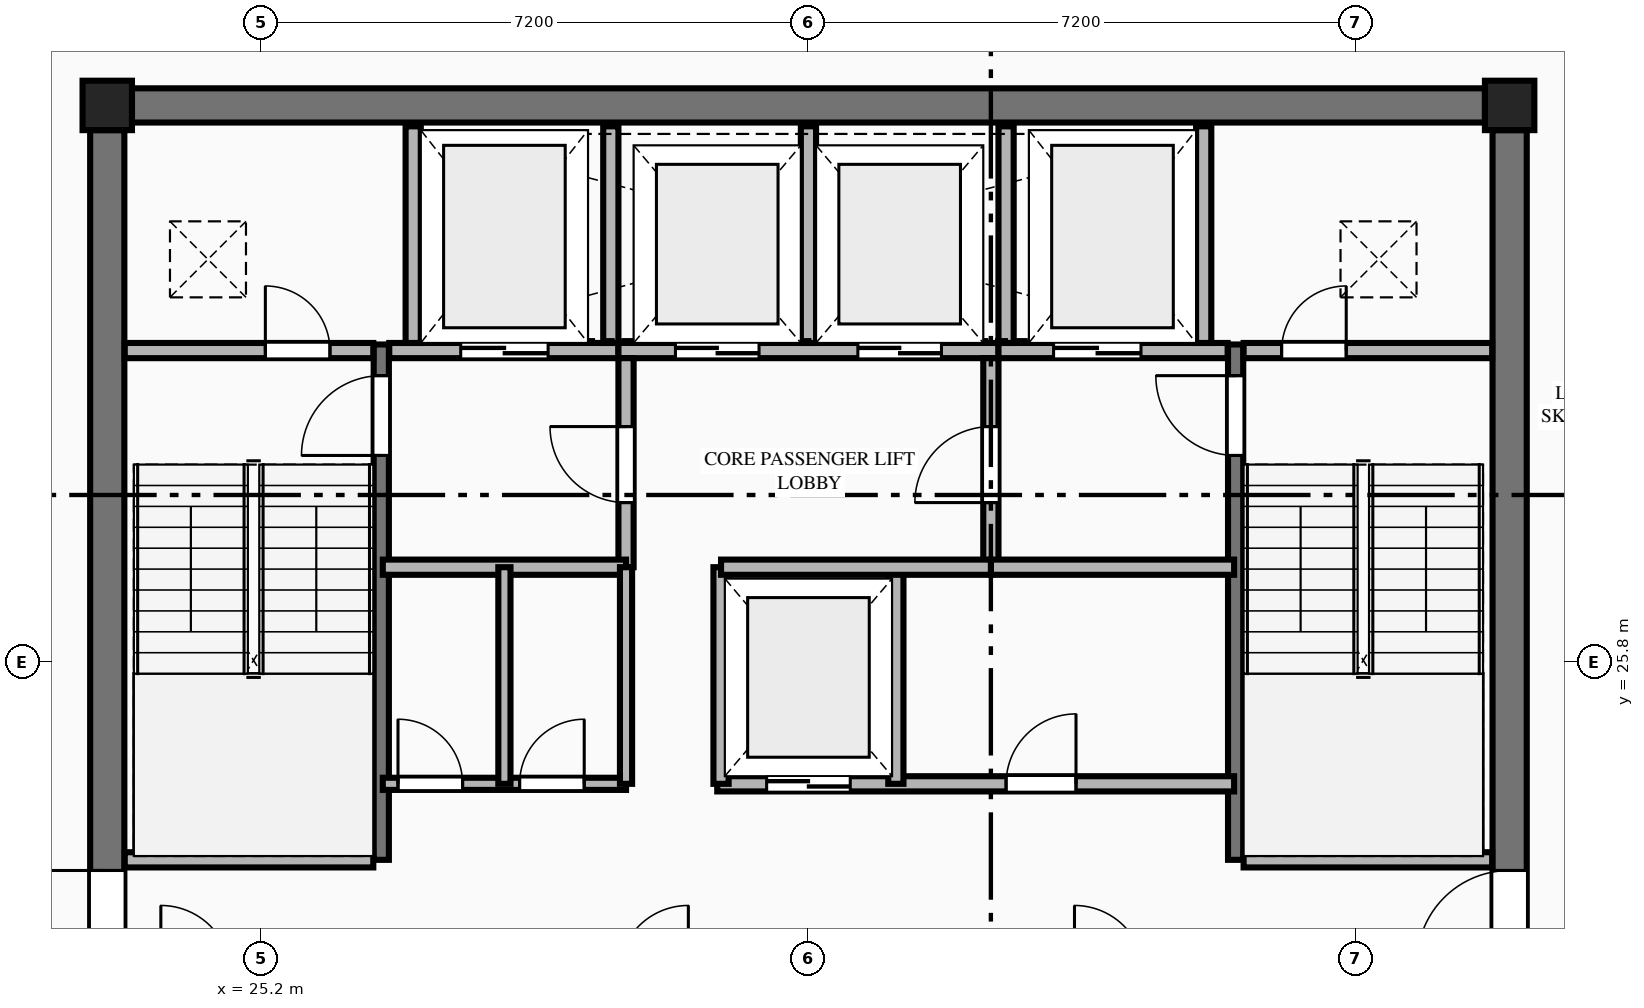
"""IFC4 building model, lengths in metres.
Left out: names, types, materials, properties, quantities, classifications, styles, units other than length and angle.
Written with IfcOpenShell. Run it as: python <this file> out.ifc"""

import sys

from ifc_helpers import new_model, si_unit, direction, frame, frame_2d, origin, origin_2d, place, context, subcontext, project, spatial, rectangle, extrude, element, fill, save


model = new_model("IFC4")
c1 = context("Model", 3, precision=1e-05, world=origin(), true_north=direction((0.0, 1.0)))
c2 = subcontext(c1, "Body", "Model", "MODEL_VIEW")
j1 = project(units=[si_unit("LENGTHUNIT", "METRE"), si_unit("PLANEANGLEUNIT", "RADIAN")], contexts=[c1])
p1 = place(None, origin())
s1 = spatial("IfcSite", under=j1, at=p1, CompositionType="ELEMENT")
p2 = place(p1, origin())
s2 = spatial("IfcBuilding", under=s1, at=p2, CompositionType="ELEMENT")
p3 = place(p2, frame((0.0, 0.0, 274.45)))
s3 = spatial("IfcBuildingStorey", under=s2, at=p3, CompositionType="ELEMENT", Elevation=274.45)
for number, where, z_axis, x_axis in (
    (1, (41.625, 33.125, 0.0), (0.0, 0.0, 1.0), (1.0, 0.0, 0.0)),
    (2, (23.175, 33.125, 0.0), (0.0, 0.0, 1.0), (1.0, 0.0, 0.0)),
):
    element("IfcColumn", number, at=place(p3, frame(where, z_axis=z_axis, x_axis=x_axis)), inside=s3, PredefinedType="COLUMN", context=c2, shape_type="SweptSolid", body=[
        extrude(rectangle(XDim=0.65, YDim=0.65, at=origin_2d()), origin(), (0.0, 0.0, 1.0), 3.65),
    ])
p4 = place(p3, frame((23.5, 33.125, 0.0), z_axis=(0.0, 0.0, 1.0), x_axis=(1.0, 0.0, 0.0)))
e3 = element("IfcWall", 3, at=p4, inside=s3, PredefinedType="SHEAR", context=c2, shape_type="SweptSolid", body=[
    extrude(rectangle(XDim=17.8, YDim=0.45, at=frame_2d((8.9, 0.0))), origin(), (0.0, 0.0, 1.0), 3.37),
])
p5 = place(p3, frame((23.175, 19.0, 0.0), z_axis=(0.0, 0.0, 1.0), x_axis=(0.0, 1.0, 0.0)))
e4 = element("IfcWall", 4, at=p5, inside=s3, PredefinedType="SHEAR", context=c2, shape_type="SweptSolid", body=[
    extrude(rectangle(XDim=13.8, YDim=0.45, at=frame_2d((6.9, 0.0))), origin(), (0.0, 0.0, 1.0), 3.37),
])
p6 = place(p5, frame((2.84, 0.0, 0.0)))
e5 = element("IfcOpeningElement", 5, at=p6, cuts=e4, PredefinedType="OPENING", context=c2, shape_type="SweptSolid", body=[
    extrude(rectangle(XDim=1.22, YDim=2.25, at=frame_2d((0.61, 1.125))), frame((0.0, 0.235, 0.0), z_axis=(0.0, -1.0, 0.0), x_axis=(1.0, 0.0, 0.0)), (0.0, 0.0, 1.0), 0.47),
])
p7 = place(p3, frame((41.625, 19.0, 0.0), z_axis=(0.0, 0.0, 1.0), x_axis=(0.0, 1.0, 0.0)))
e6 = element("IfcWall", 6, at=p7, inside=s3, PredefinedType="SHEAR", context=c2, shape_type="SweptSolid", body=[
    extrude(rectangle(XDim=13.8, YDim=0.45, at=frame_2d((6.9, 0.0))), origin(), (0.0, 0.0, 1.0), 3.37),
])
p8 = place(p7, frame((2.84, 0.0, 0.0)))
e7 = element("IfcOpeningElement", 7, at=p8, cuts=e6, PredefinedType="OPENING", context=c2, shape_type="SweptSolid", body=[
    extrude(rectangle(XDim=1.22, YDim=2.25, at=frame_2d((0.61, 1.125))), frame((0.0, 0.235, 0.0), z_axis=(0.0, -1.0, 0.0), x_axis=(1.0, 0.0, 0.0)), (0.0, 0.0, 1.0), 0.47),
])
p9 = place(p3, frame((26.78, 23.2, 0.0), z_axis=(0.0, 0.0, 1.0), x_axis=(0.0, 1.0, 0.0)))
e8 = element("IfcWall", 8, at=p9, inside=s3, PredefinedType="SHEAR", context=c2, shape_type="SweptSolid", body=[
    extrude(rectangle(XDim=6.78, YDim=0.2, at=frame_2d((3.39, 0.0))), origin(), (0.0, 0.0, 1.0), 3.65),
])
p10 = place(p9, frame((5.32, 0.0, 0.0)))
e9 = element("IfcOpeningElement", 9, at=p10, cuts=e8, PredefinedType="OPENING", context=c2, shape_type="SweptSolid", body=[
    extrude(rectangle(XDim=1.05, YDim=2.15, at=frame_2d((0.525, 1.075))), frame((0.0, 0.11, 0.0), z_axis=(0.0, -1.0, 0.0), x_axis=(1.0, 0.0, 0.0)), (0.0, 0.0, 1.0), 0.22),
])
p11 = place(p3, frame((23.405, 23.2, 0.0), z_axis=(0.0, 0.0, 1.0), x_axis=(1.0, 0.0, 0.0)))
e10 = element("IfcWall", 10, at=p11, inside=s3, PredefinedType="PLUMBINGWALL", context=c2, shape_type="SweptSolid", body=[
    extrude(rectangle(XDim=3.27, YDim=0.2, at=frame_2d((1.635, 0.0))), origin(), (0.0, 0.0, 1.0), 3.37),
])
p12 = place(p3, frame((38.02, 23.2, 0.0), z_axis=(0.0, 0.0, 1.0), x_axis=(0.0, 1.0, 0.0)))
e11 = element("IfcWall", 11, at=p12, inside=s3, PredefinedType="SHEAR", context=c2, shape_type="SweptSolid", body=[
    extrude(rectangle(XDim=6.78, YDim=0.2, at=frame_2d((3.39, 0.0))), origin(), (0.0, 0.0, 1.0), 3.65),
])
p13 = place(p12, frame((5.32, 0.0, 0.0)))
e12 = element("IfcOpeningElement", 12, at=p13, cuts=e11, PredefinedType="OPENING", context=c2, shape_type="SweptSolid", body=[
    extrude(rectangle(XDim=1.05, YDim=2.15, at=frame_2d((0.525, 1.075))), frame((0.0, 0.11, 0.0), z_axis=(0.0, -1.0, 0.0), x_axis=(1.0, 0.0, 0.0)), (0.0, 0.0, 1.0), 0.22),
])
p14 = place(p3, frame((38.125, 23.2, 0.0), z_axis=(0.0, 0.0, 1.0), x_axis=(1.0, 0.0, 0.0)))
e13 = element("IfcWall", 13, at=p14, inside=s3, PredefinedType="PLUMBINGWALL", context=c2, shape_type="SweptSolid", body=[
    extrude(rectangle(XDim=3.27, YDim=0.2, at=frame_2d((1.635, 0.0))), origin(), (0.0, 0.0, 1.0), 3.37),
])
p15 = place(p3, frame((23.405, 29.9, 0.0), z_axis=(0.0, 0.0, 1.0), x_axis=(1.0, 0.0, 0.0)))
e14 = element("IfcWall", 14, at=p15, inside=s3, PredefinedType="PLUMBINGWALL", context=c2, shape_type="SweptSolid", body=[
    extrude(rectangle(XDim=3.27, YDim=0.2, at=frame_2d((1.635, 0.0))), origin(), (0.0, 0.0, 1.0), 3.37),
])
p16 = place(p15, frame((1.85, 0.0, 0.0)))
e15 = element("IfcOpeningElement", 15, at=p16, cuts=e14, PredefinedType="OPENING", context=c2, shape_type="SweptSolid", body=[
    extrude(rectangle(XDim=0.85, YDim=2.05, at=frame_2d((0.425, 1.025))), frame((0.0, 0.11, 0.0), z_axis=(0.0, -1.0, 0.0), x_axis=(1.0, 0.0, 0.0)), (0.0, 0.0, 1.0), 0.22),
])
p17 = place(p3, frame((26.885, 29.9, 0.0), z_axis=(0.0, 0.0, 1.0), x_axis=(1.0, 0.0, 0.0)))
e16 = element("IfcWall", 16, at=p17, inside=s3, PredefinedType="PLUMBINGWALL", context=c2, shape_type="SweptSolid", body=[
    extrude(rectangle(XDim=3.015, YDim=0.2, at=frame_2d((1.507, 0.0))), origin(), (0.0, 0.0, 1.0), 3.37),
])
p18 = place(p17, frame((0.94, 0.0, 0.0)))
e17 = element("IfcOpeningElement", 17, at=p18, cuts=e16, PredefinedType="OPENING", context=c2, shape_type="SweptSolid", body=[
    extrude(rectangle(XDim=1.15, YDim=2.2, at=frame_2d((0.575, 1.1))), frame((0.0, 0.11, 0.0), z_axis=(0.0, -1.0, 0.0), x_axis=(1.0, 0.0, 0.0)), (0.0, 0.0, 1.0), 0.22),
])
p19 = place(p3, frame((29.9, 29.9, 0.0), z_axis=(0.0, 0.0, 1.0), x_axis=(1.0, 0.0, 0.0)))
e18 = element("IfcWall", 18, at=p19, inside=s3, PredefinedType="PLUMBINGWALL", context=c2, shape_type="SweptSolid", body=[
    extrude(rectangle(XDim=5.0, YDim=0.2, at=frame_2d((2.5, 0.0))), origin(), (0.0, 0.0, 1.0), 3.37),
])
p20 = place(p19, frame((0.75, 0.0, 0.0)))
e19 = element("IfcOpeningElement", 19, at=p20, cuts=e18, PredefinedType="OPENING", context=c2, shape_type="SweptSolid", body=[
    extrude(rectangle(XDim=1.1, YDim=2.2, at=frame_2d((0.55, 1.1))), frame((0.0, 0.11, 0.0), z_axis=(0.0, -1.0, 0.0), x_axis=(1.0, 0.0, 0.0)), (0.0, 0.0, 1.0), 0.22),
])
p21 = place(p19, frame((3.15, 0.0, 0.0)))
e20 = element("IfcOpeningElement", 20, at=p21, cuts=e18, PredefinedType="OPENING", context=c2, shape_type="SweptSolid", body=[
    extrude(rectangle(XDim=1.1, YDim=2.2, at=frame_2d((0.55, 1.1))), frame((0.0, 0.11, 0.0), z_axis=(0.0, -1.0, 0.0), x_axis=(1.0, 0.0, 0.0)), (0.0, 0.0, 1.0), 0.22),
])
p22 = place(p3, frame((34.9, 29.9, 0.0), z_axis=(0.0, 0.0, 1.0), x_axis=(1.0, 0.0, 0.0)))
e21 = element("IfcWall", 21, at=p22, inside=s3, PredefinedType="PLUMBINGWALL", context=c2, shape_type="SweptSolid", body=[
    extrude(rectangle(XDim=3.015, YDim=0.2, at=frame_2d((1.508, 0.0))), origin(), (0.0, 0.0, 1.0), 3.37),
])
p23 = place(p22, frame((0.725, 0.0, 0.0)))
e22 = element("IfcOpeningElement", 22, at=p23, cuts=e21, PredefinedType="OPENING", context=c2, shape_type="SweptSolid", body=[
    extrude(rectangle(XDim=1.15, YDim=2.2, at=frame_2d((0.575, 1.1))), frame((0.0, 0.11, 0.0), z_axis=(0.0, -1.0, 0.0), x_axis=(1.0, 0.0, 0.0)), (0.0, 0.0, 1.0), 0.22),
])
p24 = place(p3, frame((38.125, 29.9, 0.0), z_axis=(0.0, 0.0, 1.0), x_axis=(1.0, 0.0, 0.0)))
e23 = element("IfcWall", 23, at=p24, inside=s3, PredefinedType="PLUMBINGWALL", context=c2, shape_type="SweptSolid", body=[
    extrude(rectangle(XDim=3.27, YDim=0.2, at=frame_2d((1.635, 0.0))), origin(), (0.0, 0.0, 1.0), 3.37),
])
p25 = place(p24, frame((0.5, 0.0, 0.0)))
e24 = element("IfcOpeningElement", 24, at=p25, cuts=e23, PredefinedType="OPENING", context=c2, shape_type="SweptSolid", body=[
    extrude(rectangle(XDim=0.85, YDim=2.05, at=frame_2d((0.425, 1.025))), frame((0.0, 0.11, 0.0), z_axis=(0.0, -1.0, 0.0), x_axis=(1.0, 0.0, 0.0)), (0.0, 0.0, 1.0), 0.22),
])
for number, where, z_axis, x_axis in (
    (25, (27.2, 30.0, 0.0), (0.0, 0.0, 1.0), (0.0, 1.0, 0.0)),
    (26, (29.8, 30.0, 0.0), (0.0, 0.0, 1.0), (0.0, 1.0, 0.0)),
    (27, (32.4, 30.0, 0.0), (0.0, 0.0, 1.0), (0.0, 1.0, 0.0)),
    (28, (35.0, 30.0, 0.0), (0.0, 0.0, 1.0), (0.0, 1.0, 0.0)),
    (29, (37.6, 30.0, 0.0), (0.0, 0.0, 1.0), (0.0, 1.0, 0.0)),
):
    element("IfcWall", number, at=place(p3, frame(where, z_axis=z_axis, x_axis=x_axis)), inside=s3, PredefinedType="PLUMBINGWALL", context=c2, shape_type="SweptSolid", body=[
        extrude(rectangle(XDim=2.85, YDim=0.2, at=frame_2d((1.425, 0.0))), origin(), (0.0, 0.0, 1.0), 3.37),
    ])
p26 = place(p3, frame((30.0, 27.05, 0.0), z_axis=(0.0, 0.0, 1.0), x_axis=(0.0, 1.0, 0.0)))
e30 = element("IfcWall", 30, at=p26, inside=s3, PredefinedType="PLUMBINGWALL", context=c2, shape_type="SweptSolid", body=[
    extrude(rectangle(XDim=2.75, YDim=0.2, at=frame_2d((1.375, 0.0))), origin(), (0.0, 0.0, 1.0), 3.37),
])
p27 = place(p26, frame((0.85, 0.0, 0.0)))
e31 = element("IfcOpeningElement", 31, at=p27, cuts=e30, PredefinedType="OPENING", context=c2, shape_type="SweptSolid", body=[
    extrude(rectangle(XDim=1.0, YDim=2.15, at=frame_2d((0.5, 1.075))), frame((0.0, 0.11, 0.0), z_axis=(0.0, -1.0, 0.0), x_axis=(1.0, 0.0, 0.0)), (0.0, 0.0, 1.0), 0.22),
])
p28 = place(p3, frame((26.8, 27.05, 0.0), z_axis=(0.0, 0.0, 1.0), x_axis=(1.0, 0.0, 0.0)))
e32 = element("IfcWall", 32, at=p28, inside=s3, PredefinedType="PLUMBINGWALL", context=c2, shape_type="SweptSolid", body=[
    extrude(rectangle(XDim=3.2, YDim=0.2, at=frame_2d((1.6, 0.0))), origin(), (0.0, 0.0, 1.0), 3.37),
])
p29 = place(p3, frame((34.8, 27.05, 0.0), z_axis=(0.0, 0.0, 1.0), x_axis=(0.0, 1.0, 0.0)))
e33 = element("IfcWall", 33, at=p29, inside=s3, PredefinedType="PLUMBINGWALL", context=c2, shape_type="SweptSolid", body=[
    extrude(rectangle(XDim=2.75, YDim=0.2, at=frame_2d((1.375, 0.0))), origin(), (0.0, 0.0, 1.0), 3.37),
])
p30 = place(p29, frame((0.85, 0.0, 0.0)))
e34 = element("IfcOpeningElement", 34, at=p30, cuts=e33, PredefinedType="OPENING", context=c2, shape_type="SweptSolid", body=[
    extrude(rectangle(XDim=1.0, YDim=2.15, at=frame_2d((0.5, 1.075))), frame((0.0, 0.11, 0.0), z_axis=(0.0, -1.0, 0.0), x_axis=(1.0, 0.0, 0.0)), (0.0, 0.0, 1.0), 0.22),
])
p31 = place(p3, frame((34.8, 27.05, 0.0), z_axis=(0.0, 0.0, 1.0), x_axis=(1.0, 0.0, 0.0)))
e35 = element("IfcWall", 35, at=p31, inside=s3, PredefinedType="PLUMBINGWALL", context=c2, shape_type="SweptSolid", body=[
    extrude(rectangle(XDim=3.2, YDim=0.2, at=frame_2d((1.6, 0.0))), origin(), (0.0, 0.0, 1.0), 3.37),
])
p32 = place(p3, frame((26.8, 24.2, 0.0), z_axis=(0.0, 0.0, 1.0), x_axis=(1.0, 0.0, 0.0)))
e36 = element("IfcWall", 36, at=p32, inside=s3, PredefinedType="PARTITIONING", context=c2, shape_type="SweptSolid", body=[
    extrude(rectangle(XDim=3.2, YDim=0.16, at=frame_2d((1.6, 0.0))), origin(), (0.0, 0.0, 1.0), 3.37),
])
p33 = place(p32, frame((0.2, 0.0, 0.0)))
e37 = element("IfcOpeningElement", 37, at=p33, cuts=e36, PredefinedType="OPENING", context=c2, shape_type="SweptSolid", body=[
    extrude(rectangle(XDim=0.85, YDim=2.05, at=frame_2d((0.425, 1.025))), frame((0.0, 0.09, 0.0), z_axis=(0.0, -1.0, 0.0), x_axis=(1.0, 0.0, 0.0)), (0.0, 0.0, 1.0), 0.18),
])
p34 = place(p32, frame((1.8, 0.0, 0.0)))
e38 = element("IfcOpeningElement", 38, at=p34, cuts=e36, PredefinedType="OPENING", context=c2, shape_type="SweptSolid", body=[
    extrude(rectangle(XDim=0.85, YDim=2.05, at=frame_2d((0.425, 1.025))), frame((0.0, 0.09, 0.0), z_axis=(0.0, -1.0, 0.0), x_axis=(1.0, 0.0, 0.0)), (0.0, 0.0, 1.0), 0.18),
])
p35 = place(p3, frame((30.0, 24.2, 0.0), z_axis=(0.0, 0.0, 1.0), x_axis=(0.0, 1.0, 0.0)))
e39 = element("IfcWall", 39, at=p35, inside=s3, PredefinedType="PARTITIONING", context=c2, shape_type="SweptSolid", body=[
    extrude(rectangle(XDim=2.85, YDim=0.16, at=frame_2d((1.425, 0.0))), origin(), (0.0, 0.0, 1.0), 3.37),
])
p36 = place(p3, frame((31.2, 24.2, 0.0), z_axis=(0.0, 0.0, 1.0), x_axis=(1.0, 0.0, 0.0)))
e40 = element("IfcWall", 40, at=p36, inside=s3, PredefinedType="PLUMBINGWALL", context=c2, shape_type="SweptSolid", body=[
    extrude(rectangle(XDim=6.8, YDim=0.2, at=frame_2d((3.4, 0.0))), origin(), (0.0, 0.0, 1.0), 3.37),
])
p37 = place(p36, frame((0.65, 0.0, 0.0)))
e41 = element("IfcOpeningElement", 41, at=p37, cuts=e40, PredefinedType="OPENING", context=c2, shape_type="SweptSolid", body=[
    extrude(rectangle(XDim=1.1, YDim=2.2, at=frame_2d((0.55, 1.1))), frame((0.0, 0.11, 0.0), z_axis=(0.0, -1.0, 0.0), x_axis=(1.0, 0.0, 0.0)), (0.0, 0.0, 1.0), 0.22),
])
p38 = place(p36, frame((3.8, 0.0, 0.0)))
e42 = element("IfcOpeningElement", 42, at=p38, cuts=e40, PredefinedType="OPENING", context=c2, shape_type="SweptSolid", body=[
    extrude(rectangle(XDim=0.92, YDim=2.15, at=frame_2d((0.46, 1.075))), frame((0.0, 0.11, 0.0), z_axis=(0.0, -1.0, 0.0), x_axis=(1.0, 0.0, 0.0)), (0.0, 0.0, 1.0), 0.22),
])
for number, where, z_axis, x_axis in (
    (43, (31.25, 24.2, 0.0), (0.0, 0.0, 1.0), (0.0, 1.0, 0.0)),
    (44, (33.55, 24.2, 0.0), (0.0, 0.0, 1.0), (0.0, 1.0, 0.0)),
):
    element("IfcWall", number, at=place(p3, frame(where, z_axis=z_axis, x_axis=x_axis)), inside=s3, PredefinedType="PLUMBINGWALL", context=c2, shape_type="SweptSolid", body=[
        extrude(rectangle(XDim=2.85, YDim=0.2, at=frame_2d((1.425, 0.0))), origin(), (0.0, 0.0, 1.0), 3.37),
    ])
p39 = place(p3, frame((31.25, 27.05, 0.0), z_axis=(0.0, 0.0, 1.0), x_axis=(1.0, 0.0, 0.0)))
e45 = element("IfcWall", 45, at=p39, inside=s3, PredefinedType="PLUMBINGWALL", context=c2, shape_type="SweptSolid", body=[
    extrude(rectangle(XDim=3.55, YDim=0.2, at=frame_2d((1.775, 0.0))), origin(), (0.0, 0.0, 1.0), 3.37),
])
p40 = place(p3, frame((28.4, 24.2, 0.0), z_axis=(0.0, 0.0, 1.0), x_axis=(0.0, 1.0, 0.0)))
e46 = element("IfcWall", 46, at=p40, inside=s3, PredefinedType="PARTITIONING", context=c2, shape_type="SweptSolid", body=[
    extrude(rectangle(XDim=2.85, YDim=0.16, at=frame_2d((1.425, 0.0))), origin(), (0.0, 0.0, 1.0), 3.37),
])
p41 = place(p6, origin())
e47 = element("IfcDoor", 47, at=p41, inside=s3, OperationType="SINGLE_SWING_RIGHT", PredefinedType="DOOR", context=c2, shape_type="SweptSolid", body=[
    extrude(rectangle(XDim=1.22, YDim=2.25, at=frame_2d((0.61, 1.125))), frame((0.0, 0.025, 0.0), z_axis=(0.0, -1.0, 0.0), x_axis=(1.0, 0.0, 0.0)), (0.0, 0.0, 1.0), 0.05),
])
fill(e5, e47)
p42 = place(p8, origin())
e48 = element("IfcDoor", 48, at=p42, inside=s3, OperationType="SINGLE_SWING_LEFT", PredefinedType="DOOR", context=c2, shape_type="SweptSolid", body=[
    extrude(rectangle(XDim=1.22, YDim=2.25, at=frame_2d((0.61, 1.125))), frame((0.0, 0.025, 0.0), z_axis=(0.0, -1.0, 0.0), x_axis=(1.0, 0.0, 0.0)), (0.0, 0.0, 1.0), 0.05),
])
fill(e7, e48)
p43 = place(p10, origin())
e49 = element("IfcDoor", 49, at=p43, inside=s3, OperationType="SINGLE_SWING_LEFT", PredefinedType="DOOR", context=c2, shape_type="SweptSolid", body=[
    extrude(rectangle(XDim=1.05, YDim=2.15, at=frame_2d((0.525, 1.075))), frame((0.0, 0.025, 0.0), z_axis=(0.0, -1.0, 0.0), x_axis=(1.0, 0.0, 0.0)), (0.0, 0.0, 1.0), 0.05),
])
fill(e9, e49)
p44 = place(p13, origin())
e50 = element("IfcDoor", 50, at=p44, inside=s3, OperationType="SINGLE_SWING_RIGHT", PredefinedType="DOOR", context=c2, shape_type="SweptSolid", body=[
    extrude(rectangle(XDim=1.05, YDim=2.15, at=frame_2d((0.525, 1.075))), frame((0.0, 0.025, 0.0), z_axis=(0.0, -1.0, 0.0), x_axis=(1.0, 0.0, 0.0)), (0.0, 0.0, 1.0), 0.05),
])
fill(e12, e50)
p45 = place(p16, origin())
e51 = element("IfcDoor", 51, at=p45, inside=s3, OperationType="SINGLE_SWING_LEFT", PredefinedType="DOOR", context=c2, shape_type="SweptSolid", body=[
    extrude(rectangle(XDim=0.85, YDim=2.05, at=frame_2d((0.425, 1.025))), frame((0.0, 0.025, 0.0), z_axis=(0.0, -1.0, 0.0), x_axis=(1.0, 0.0, 0.0)), (0.0, 0.0, 1.0), 0.05),
])
fill(e15, e51)
p46 = place(p25, origin())
e52 = element("IfcDoor", 52, at=p46, inside=s3, OperationType="SINGLE_SWING_RIGHT", PredefinedType="DOOR", context=c2, shape_type="SweptSolid", body=[
    extrude(rectangle(XDim=0.85, YDim=2.05, at=frame_2d((0.425, 1.025))), frame((0.0, 0.025, 0.0), z_axis=(0.0, -1.0, 0.0), x_axis=(1.0, 0.0, 0.0)), (0.0, 0.0, 1.0), 0.05),
])
fill(e24, e52)
p47 = place(p18, origin())
e53 = element("IfcDoor", 53, at=p47, inside=s3, OperationType="DOUBLE_DOOR_SLIDING", PredefinedType="DOOR", context=c2, shape_type="SweptSolid", body=[
    extrude(rectangle(XDim=1.15, YDim=2.2, at=frame_2d((0.575, 1.1))), frame((0.0, 0.025, 0.0), z_axis=(0.0, -1.0, 0.0), x_axis=(1.0, 0.0, 0.0)), (0.0, 0.0, 1.0), 0.05),
])
fill(e17, e53)
p48 = place(p23, origin())
e54 = element("IfcDoor", 54, at=p48, inside=s3, OperationType="DOUBLE_DOOR_SLIDING", PredefinedType="DOOR", context=c2, shape_type="SweptSolid", body=[
    extrude(rectangle(XDim=1.15, YDim=2.2, at=frame_2d((0.575, 1.1))), frame((0.0, 0.025, 0.0), z_axis=(0.0, -1.0, 0.0), x_axis=(1.0, 0.0, 0.0)), (0.0, 0.0, 1.0), 0.05),
])
fill(e22, e54)
p49 = place(p20, origin())
e55 = element("IfcDoor", 55, at=p49, inside=s3, OperationType="DOUBLE_DOOR_SLIDING", PredefinedType="DOOR", context=c2, shape_type="SweptSolid", body=[
    extrude(rectangle(XDim=1.1, YDim=2.2, at=frame_2d((0.55, 1.1))), frame((0.0, 0.025, 0.0), z_axis=(0.0, -1.0, 0.0), x_axis=(1.0, 0.0, 0.0)), (0.0, 0.0, 1.0), 0.05),
])
fill(e19, e55)
p50 = place(p21, origin())
e56 = element("IfcDoor", 56, at=p50, inside=s3, OperationType="DOUBLE_DOOR_SLIDING", PredefinedType="DOOR", context=c2, shape_type="SweptSolid", body=[
    extrude(rectangle(XDim=1.1, YDim=2.2, at=frame_2d((0.55, 1.1))), frame((0.0, 0.025, 0.0), z_axis=(0.0, -1.0, 0.0), x_axis=(1.0, 0.0, 0.0)), (0.0, 0.0, 1.0), 0.05),
])
fill(e20, e56)
p51 = place(p27, origin())
e57 = element("IfcDoor", 57, at=p51, inside=s3, OperationType="SINGLE_SWING_RIGHT", PredefinedType="DOOR", context=c2, shape_type="SweptSolid", body=[
    extrude(rectangle(XDim=1.0, YDim=2.15, at=frame_2d((0.5, 1.075))), frame((0.0, 0.025, 0.0), z_axis=(0.0, -1.0, 0.0), x_axis=(1.0, 0.0, 0.0)), (0.0, 0.0, 1.0), 0.05),
])
fill(e31, e57)
p52 = place(p30, origin())
e58 = element("IfcDoor", 58, at=p52, inside=s3, OperationType="SINGLE_SWING_LEFT", PredefinedType="DOOR", context=c2, shape_type="SweptSolid", body=[
    extrude(rectangle(XDim=1.0, YDim=2.15, at=frame_2d((0.5, 1.075))), frame((0.0, 0.025, 0.0), z_axis=(0.0, -1.0, 0.0), x_axis=(1.0, 0.0, 0.0)), (0.0, 0.0, 1.0), 0.05),
])
fill(e34, e58)
p53 = place(p37, origin())
e59 = element("IfcDoor", 59, at=p53, inside=s3, OperationType="DOUBLE_DOOR_SLIDING", PredefinedType="DOOR", context=c2, shape_type="SweptSolid", body=[
    extrude(rectangle(XDim=1.1, YDim=2.2, at=frame_2d((0.55, 1.1))), frame((0.0, 0.025, 0.0), z_axis=(0.0, -1.0, 0.0), x_axis=(1.0, 0.0, 0.0)), (0.0, 0.0, 1.0), 0.05),
])
fill(e41, e59)
p54 = place(p33, origin())
e60 = element("IfcDoor", 60, at=p54, inside=s3, OperationType="SINGLE_SWING_LEFT", PredefinedType="DOOR", context=c2, shape_type="SweptSolid", body=[
    extrude(rectangle(XDim=0.85, YDim=2.05, at=frame_2d((0.425, 1.025))), frame((0.0, 0.025, 0.0), z_axis=(0.0, -1.0, 0.0), x_axis=(1.0, 0.0, 0.0)), (0.0, 0.0, 1.0), 0.05),
])
fill(e37, e60)
p55 = place(p34, origin())
e61 = element("IfcDoor", 61, at=p55, inside=s3, OperationType="SINGLE_SWING_RIGHT", PredefinedType="DOOR", context=c2, shape_type="SweptSolid", body=[
    extrude(rectangle(XDim=0.85, YDim=2.05, at=frame_2d((0.425, 1.025))), frame((0.0, 0.025, 0.0), z_axis=(0.0, -1.0, 0.0), x_axis=(1.0, 0.0, 0.0)), (0.0, 0.0, 1.0), 0.05),
])
fill(e38, e61)
p56 = place(p38, origin())
e62 = element("IfcDoor", 62, at=p56, inside=s3, OperationType="SINGLE_SWING_RIGHT", PredefinedType="DOOR", context=c2, shape_type="SweptSolid", body=[
    extrude(rectangle(XDim=0.92, YDim=2.15, at=frame_2d((0.46, 1.075))), frame((0.0, 0.025, 0.0), z_axis=(0.0, -1.0, 0.0), x_axis=(1.0, 0.0, 0.0)), (0.0, 0.0, 1.0), 0.05),
])
fill(e42, e62)
save(model, sys.argv[1])
